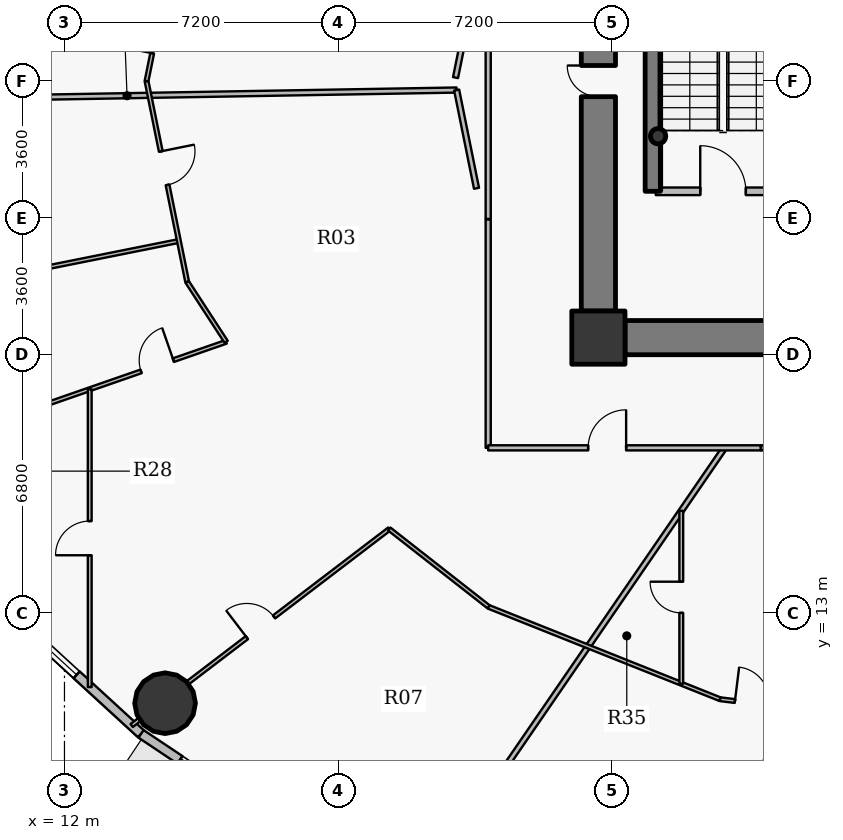
"""IFC4 building model, lengths in metres.
Left out: names, types, materials, properties, quantities, classifications, styles, units other than length and angle.
Written with IfcOpenShell. Run it as: python <this file> out.ifc"""

import sys

from ifc_helpers import new_model, si_unit, direction, frame, frame_2d, origin, origin_2d, place, context, subcontext, project, spatial, rectangle, hollow_circle, extrude, source, transform, mapped, element, fill, save


model = new_model("IFC4")
c1 = context("Model", 3, precision=1e-05, world=origin(), true_north=direction((0.0, 1.0)))
c2 = subcontext(c1, "Body", "Model", "MODEL_VIEW")
j1 = project(units=[si_unit("LENGTHUNIT", "METRE"), si_unit("PLANEANGLEUNIT", "RADIAN")], contexts=[c1])
p1 = place(None, origin())
s1 = spatial("IfcSite", under=j1, at=p1, CompositionType="ELEMENT")
p2 = place(p1, origin())
s2 = spatial("IfcBuilding", under=s1, at=p2, CompositionType="ELEMENT")
p3 = place(p2, frame((0.0, 0.0, 78.6)))
s3 = spatial("IfcBuildingStorey", under=s2, at=p3, CompositionType="ELEMENT", Elevation=78.6)
p4 = place(p3, frame((26.05, 20.25, 0.0), z_axis=(0.0, 0.0, 1.0), x_axis=(1.0, 0.0, 0.0)))
e1 = element("IfcColumn", 1, at=p4, inside=s3, PredefinedType="COLUMN", context=c2, shape_type="SweptSolid", body=[
    extrude(rectangle(XDim=1.4, YDim=1.4, at=origin_2d()), origin(), (0.0, 0.0, 1.0), 4.2),
])
p5 = place(p3, frame((27.48, 24.1, 0.0), z_axis=(0.0, 0.0, 1.0), x_axis=(0.0, 1.0, 0.0)))
e2 = element("IfcWall", 2, at=p5, inside=s3, PredefinedType="SHEAR", context=c2, shape_type="SweptSolid", body=[
    extrude(rectangle(XDim=8.6, YDim=0.4, at=frame_2d((4.3, 0.0))), origin(), (0.0, 0.0, 1.0), 4.2),
])
p6 = place(p3, frame((27.62, 25.55, 0.0), z_axis=(0.0, 0.0, 1.0), x_axis=(1.0, 0.0, 0.0)))
e3 = element("IfcColumn", 3, at=p6, inside=s3, PredefinedType="COLUMN", context=c2, shape_type="SweptSolid", body=[
    extrude(hollow_circle(Radius=0.203, WallThickness=0.016, at=origin_2d()), origin(), (0.0, 0.0, 1.0), 4.2),
])
p7 = place(p3, frame((45.25, 20.25, 0.0), z_axis=(0.0, 0.0, 1.0), x_axis=(-1.0, 0.0, 0.0)))
e4 = element("IfcWall", 4, at=p7, inside=s3, PredefinedType="SHEAR", context=c2, shape_type="SweptSolid", body=[
    extrude(rectangle(XDim=18.5, YDim=0.9, at=frame_2d((9.25, 0.0))), origin(), (0.0, 0.0, 1.0), 3.4),
])
p8 = place(p7, frame((10.0, 0.0, 0.0)))
e5 = element("IfcOpeningElement", 5, at=p8, cuts=e4, PredefinedType="OPENING", context=c2, shape_type="SweptSolid", body=[
    extrude(rectangle(XDim=1.15, YDim=2.15, at=origin_2d()), frame((0.575, 0.46, 1.075), z_axis=(0.0, -1.0, 0.0), x_axis=(1.0, 0.0, 0.0)), (0.0, 0.0, 1.0), 0.92),
])
p9 = place(p3, frame((26.05, 20.95, 0.0), z_axis=(0.0, 0.0, 1.0), x_axis=(0.0, 1.0, 0.0)))
e6 = element("IfcWall", 6, at=p9, inside=s3, PredefinedType="SHEAR", context=c2, shape_type="SweptSolid", body=[
    extrude(rectangle(XDim=12.1, YDim=0.9, at=frame_2d((6.05, 0.0))), origin(), (0.0, 0.0, 1.0), 3.4),
])
p10 = place(p9, frame((5.64, 0.0, 0.0)))
e7 = element("IfcOpeningElement", 7, at=p10, cuts=e6, PredefinedType="OPENING", context=c2, shape_type="SweptSolid", body=[
    extrude(rectangle(XDim=0.82, YDim=2.1, at=origin_2d()), frame((0.41, 0.46, 1.05), z_axis=(0.0, -1.0, 0.0), x_axis=(1.0, 0.0, 0.0)), (0.0, 0.0, 1.0), 0.92),
])
p11 = place(p3, frame((14.647, 10.631, 0.0), z_axis=(0.0, 0.0, 1.0), x_axis=(1.0, 0.0, 0.0)))
e8 = element("IfcColumn", 8, at=p11, inside=s3, PredefinedType="COLUMN", context=c2, shape_type="SweptSolid", body=[
    extrude(hollow_circle(Radius=0.8, WallThickness=0.045, at=origin_2d()), origin(), (0.0, 0.0, 1.0), 4.2),
])
p12 = place(p3, frame((14.015, 9.824, 0.0), z_axis=(0.0, 0.0, 1.0), x_axis=(-0.737116376281, 0.67576582321, 0.0)))
e9 = element("IfcWall", 9, at=p12, inside=s3, PredefinedType="SOLIDWALL", context=c2, shape_type="SweptSolid", body=[
    extrude(rectangle(XDim=4.294, YDim=0.24, at=frame_2d((2.147, 0.0))), origin(), (0.0, 0.0, 1.0), 3.95),
])
p13 = place(p12, frame((2.3, 0.0, 0.9)))
e10 = element("IfcOpeningElement", 10, at=p13, cuts=e9, PredefinedType="OPENING", context=c2, shape_type="SweptSolid", body=[
    extrude(rectangle(XDim=1.25, YDim=1.65, at=origin_2d()), frame((0.625, 0.13, 0.825), z_axis=(0.0, -1.0, 0.0), x_axis=(1.0, 0.0, 0.0)), (0.0, 0.0, 1.0), 0.26),
])
p14 = place(p3, frame((17.723, 7.344, 0.0), z_axis=(0.0, 0.0, 1.0), x_axis=(-0.831240982525, 0.555912249343, 0.0)))
e11 = element("IfcWall", 11, at=p14, inside=s3, PredefinedType="SOLIDWALL", context=c2, shape_type="SweptSolid", body=[
    extrude(rectangle(XDim=4.46, YDim=0.24, at=frame_2d((2.23, 0.0))), origin(), (0.0, 0.0, 1.0), 3.95),
])
p15 = place(p14, frame((1.23, 0.0, 0.9)))
e12 = element("IfcOpeningElement", 12, at=p15, cuts=e11, PredefinedType="OPENING", context=c2, shape_type="SweptSolid", body=[
    extrude(rectangle(XDim=2.0, YDim=1.75, at=origin_2d()), frame((1.0, 0.13, 0.875), z_axis=(0.0, -1.0, 0.0), x_axis=(1.0, 0.0, 0.0)), (0.0, 0.0, 1.0), 0.26),
])
p16 = place(p3, frame((4.974, 26.466, 0.0), z_axis=(0.0, 0.0, 1.0), x_axis=(0.999851881099, 0.017210922752, 0.0)))
e13 = element("IfcWall", 13, at=p16, inside=s3, PredefinedType="PARTITIONING", context=c2, shape_type="SweptSolid", body=[
    extrude(rectangle(XDim=17.349, YDim=0.135, at=frame_2d((8.674, 0.0))), origin(), (0.0, 0.0, 1.0), 3.285),
])
p17 = place(p3, frame((5.982, 20.983, 0.0), z_axis=(0.0, 0.0, 1.0), x_axis=(0.980501056264, 0.19651381291, 0.0)))
e14 = element("IfcWall", 14, at=p17, inside=s3, PredefinedType="PARTITIONING", context=c2, shape_type="SweptSolid", body=[
    extrude(rectangle(XDim=9.208, YDim=0.1, at=frame_2d((4.604, 0.0))), origin(), (0.0, 0.0, 1.0), 3.335),
])
p18 = place(p3, frame((7.675, 17.158, 0.0), z_axis=(0.0, 0.0, 1.0), x_axis=(0.944607706733, 0.328201584976, 0.0)))
e15 = element("IfcWall", 15, at=p18, inside=s3, PredefinedType="PARTITIONING", context=c2, shape_type="SweptSolid", body=[
    extrude(rectangle(XDim=9.083, YDim=0.1, at=frame_2d((4.542, 0.0))), origin(), (0.0, 0.0, 1.0), 3.335),
])
p19 = place(p18, frame((6.713, 0.0, 0.0)))
e16 = element("IfcOpeningElement", 16, at=p19, cuts=e15, PredefinedType="OPENING", context=c2, shape_type="SweptSolid", body=[
    extrude(rectangle(XDim=0.9, YDim=2.1, at=origin_2d()), frame((0.45, 0.06, 1.05), z_axis=(0.0, -1.0, 0.0), x_axis=(1.0, 0.0, 0.0)), (0.0, 0.0, 1.0), 0.12),
])
p20 = place(p18, frame((1.046, 0.0, 0.0)))
e17 = element("IfcOpeningElement", 17, at=p20, cuts=e15, PredefinedType="OPENING", context=c2, shape_type="SweptSolid", body=[
    extrude(rectangle(XDim=0.82, YDim=2.1, at=origin_2d()), frame((0.41, 0.06, 1.05), z_axis=(0.0, -1.0, 0.0), x_axis=(1.0, 0.0, 0.0)), (0.0, 0.0, 1.0), 0.12),
])
p21 = place(p3, frame((12.665, 11.055, 0.0), z_axis=(0.0, 0.0, 1.0), x_axis=(0.0, 1.0, 0.0)))
e18 = element("IfcWall", 18, at=p21, inside=s3, PredefinedType="PARTITIONING", context=c2, shape_type="SweptSolid", body=[
    extrude(rectangle(XDim=7.837, YDim=0.1, at=frame_2d((3.919, 0.0))), origin(), (0.0, 0.0, 1.0), 3.335),
])
p22 = place(p21, frame((3.469, 0.0, 0.0)))
e19 = element("IfcOpeningElement", 19, at=p22, cuts=e18, PredefinedType="OPENING", context=c2, shape_type="SweptSolid", body=[
    extrude(rectangle(XDim=0.9, YDim=2.1, at=origin_2d()), frame((0.45, 0.06, 1.05), z_axis=(0.0, -1.0, 0.0), x_axis=(1.0, 0.0, 0.0)), (0.0, 0.0, 1.0), 0.12),
])
p23 = place(p3, frame((13.768, 10.043, 0.0), z_axis=(0.0, 0.0, 1.0), x_axis=(0.795121316636, 0.606450403439, 0.0)))
e20 = element("IfcWall", 20, at=p23, inside=s3, PredefinedType="PARTITIONING", context=c2, shape_type="SweptSolid", body=[
    extrude(rectangle(XDim=8.525, YDim=0.1, at=frame_2d((4.262, 0.0))), origin(), (0.0, 0.0, 1.0), 3.285),
])
p24 = place(p23, frame((3.812, 0.0, 0.0)))
e21 = element("IfcOpeningElement", 21, at=p24, cuts=e20, PredefinedType="OPENING", context=c2, shape_type="SweptSolid", body=[
    extrude(rectangle(XDim=0.9, YDim=2.1, at=origin_2d()), frame((0.45, 0.06, 1.05), z_axis=(0.0, -1.0, 0.0), x_axis=(1.0, 0.0, 0.0)), (0.0, 0.0, 1.0), 0.12),
])
p25 = place(p3, frame((14.16, 27.0, 0.0), z_axis=(0.0, 0.0, 1.0), x_axis=(0.198292702032, -0.980142848936, 0.0)))
e22 = element("IfcWall", 22, at=p25, inside=s3, PredefinedType="PARTITIONING", context=c2, shape_type="SweptSolid", body=[
    extrude(rectangle(XDim=5.392, YDim=0.1, at=frame_2d((2.696, 0.0))), origin(), (0.0, 0.0, 1.0), 3.285),
])
p26 = place(p25, frame((1.887, 0.0, 0.0)))
e23 = element("IfcOpeningElement", 23, at=p26, cuts=e22, PredefinedType="OPENING", context=c2, shape_type="SweptSolid", body=[
    extrude(rectangle(XDim=0.9, YDim=2.1, at=origin_2d()), frame((0.45, 0.06, 1.05), z_axis=(0.0, -1.0, 0.0), x_axis=(1.0, 0.0, 0.0)), (0.0, 0.0, 1.0), 0.12),
])
p27 = place(p3, frame((14.16, 27.0, 0.0), z_axis=(0.0, 0.0, 1.0), x_axis=(0.198292702032, 0.980142848936, 0.0)))
e24 = element("IfcWall", 24, at=p27, inside=s3, PredefinedType="PARTITIONING", context=c2, shape_type="SweptSolid", body=[
    extrude(rectangle(XDim=5.392, YDim=0.1, at=frame_2d((2.696, 0.0))), origin(), (0.0, 0.0, 1.0), 3.285),
])
p28 = place(p27, frame((0.749, 0.0, 0.0)))
e25 = element("IfcOpeningElement", 25, at=p28, cuts=e24, PredefinedType="OPENING", context=c2, shape_type="SweptSolid", body=[
    extrude(rectangle(XDim=0.9, YDim=2.1, at=origin_2d()), frame((0.45, 0.06, 1.05), z_axis=(0.0, -1.0, 0.0), x_axis=(1.0, 0.0, 0.0)), (0.0, 0.0, 1.0), 0.12),
])
p29 = place(p3, frame((15.229, 21.716, 0.0), z_axis=(0.0, 0.0, 1.0), x_axis=(0.545316895374, -0.838229970604, 0.0)))
e26 = element("IfcWall", 26, at=p29, inside=s3, PredefinedType="PARTITIONING", context=c2, shape_type="SweptSolid", body=[
    extrude(rectangle(XDim=1.88, YDim=0.1, at=frame_2d((0.94, 0.0))), origin(), (0.0, 0.0, 1.0), 3.285),
])
p30 = place(p3, frame((20.547, 15.213, 0.0), z_axis=(0.0, 0.0, 1.0), x_axis=(0.78737784261, -0.616470707307, 0.0)))
e27 = element("IfcWall", 27, at=p30, inside=s3, PredefinedType="PARTITIONING", context=c2, shape_type="SweptSolid", body=[
    extrude(rectangle(XDim=3.323, YDim=0.1, at=frame_2d((1.661, 0.0))), origin(), (0.0, 0.0, 1.0), 3.285),
])
p31 = place(p3, frame((21.309, 5.618, 0.0), z_axis=(0.0, 0.0, 1.0), x_axis=(0.566302415372, 0.82419753357, 0.0)))
e28 = element("IfcWall", 28, at=p31, inside=s3, PredefinedType="PARTITIONING", context=c2, shape_type="SweptSolid", body=[
    extrude(rectangle(XDim=14.234, YDim=0.135, at=frame_2d((7.117, 0.0))), origin(), (0.0, 0.0, 1.0), 3.285),
])
p32 = place(p3, frame((23.15, 17.35, 0.0), z_axis=(0.0, 0.0, 1.0), x_axis=(0.0, 1.0, 0.0)))
e29 = element("IfcWall", 29, at=p32, inside=s3, PredefinedType="PARTITIONING", context=c2, shape_type="SweptSolid", body=[
    extrude(rectangle(XDim=6.011, YDim=0.135, at=frame_2d((3.006, 0.0))), origin(), (0.0, 0.0, 1.0), 3.285),
])
p33 = place(p3, frame((23.15, 17.35, 0.0), z_axis=(0.0, 0.0, 1.0), x_axis=(1.0, 0.0, 0.0)))
e30 = element("IfcWall", 30, at=p33, inside=s3, PredefinedType="PARTITIONING", context=c2, shape_type="SweptSolid", body=[
    extrude(rectangle(XDim=7.171, YDim=0.135, at=frame_2d((3.586, 0.0))), origin(), (0.0, 0.0, 1.0), 3.285),
])
p34 = place(p33, frame((2.63, 0.0, 0.0)))
e31 = element("IfcOpeningElement", 31, at=p34, cuts=e30, PredefinedType="OPENING", context=c2, shape_type="SweptSolid", body=[
    extrude(rectangle(XDim=1.0, YDim=2.15, at=origin_2d()), frame((0.5, 0.078, 1.075), z_axis=(0.0, -1.0, 0.0), x_axis=(1.0, 0.0, 0.0)), (0.0, 0.0, 1.0), 0.155),
])
p35 = place(p3, frame((23.163, 13.165, 0.0), z_axis=(0.0, 0.0, 1.0), x_axis=(0.928799979038, -0.370581433613, 0.0)))
e32 = element("IfcWall", 32, at=p35, inside=s3, PredefinedType="PARTITIONING", context=c2, shape_type="SweptSolid", body=[
    extrude(rectangle(XDim=6.555, YDim=0.1, at=frame_2d((3.278, 0.0))), origin(), (0.0, 0.0, 1.0), 3.285),
])
p36 = place(p3, frame((27.56, 24.1, 0.0), z_axis=(0.0, 0.0, 1.0), x_axis=(1.0, 0.0, 0.0)))
e33 = element("IfcWall", 33, at=p36, inside=s3, PredefinedType="PARTITIONING", context=c2, shape_type="SweptSolid", body=[
    extrude(rectangle(XDim=3.54, YDim=0.2, at=frame_2d((1.77, 0.0))), origin(), (0.0, 0.0, 1.0), 3.95),
])
p37 = place(p36, frame((1.17, 0.0, 0.0)))
e34 = element("IfcOpeningElement", 34, at=p37, cuts=e33, PredefinedType="OPENING", context=c2, shape_type="SweptSolid", body=[
    extrude(rectangle(XDim=1.2, YDim=2.15, at=origin_2d()), frame((0.6, 0.11, 1.075), z_axis=(0.0, -1.0, 0.0), x_axis=(1.0, 0.0, 0.0)), (0.0, 0.0, 1.0), 0.22),
])
p38 = place(p3, frame((28.231, 11.143, 0.0), z_axis=(0.0, 0.0, 1.0), x_axis=(0.0, 1.0, 0.0)))
e35 = element("IfcWall", 35, at=p38, inside=s3, PredefinedType="PARTITIONING", context=c2, shape_type="SweptSolid", body=[
    extrude(rectangle(XDim=4.55, YDim=0.1, at=frame_2d((2.275, 0.0))), origin(), (0.0, 0.0, 1.0), 3.285),
])
p39 = place(p38, frame((1.865, 0.0, 0.0)))
e36 = element("IfcOpeningElement", 36, at=p39, cuts=e35, PredefinedType="OPENING", context=c2, shape_type="SweptSolid", body=[
    extrude(rectangle(XDim=0.82, YDim=2.1, at=origin_2d()), frame((0.41, 0.06, 1.05), z_axis=(0.0, -1.0, 0.0), x_axis=(1.0, 0.0, 0.0)), (0.0, 0.0, 1.0), 0.12),
])
p40 = place(p3, frame((28.689, 3.449, 0.0), z_axis=(0.0, 0.0, 1.0), x_axis=(0.296478934609, 0.955039392556, 0.0)))
e37 = element("IfcWall", 37, at=p40, inside=s3, PredefinedType="PARTITIONING", context=c2, shape_type="SweptSolid", body=[
    extrude(rectangle(XDim=7.417, YDim=0.1, at=frame_2d((3.708, 0.0))), origin(), (0.0, 0.0, 1.0), 3.335),
])
p41 = place(p3, frame((29.251, 10.736, 0.0), z_axis=(0.0, 0.0, 1.0), x_axis=(0.992394520877, -0.123097989151, 0.0)))
e38 = element("IfcWall", 38, at=p41, inside=s3, PredefinedType="PARTITIONING", context=c2, shape_type="SweptSolid", body=[
    extrude(rectangle(XDim=6.801, YDim=0.1, at=frame_2d((3.4, 0.0))), origin(), (0.0, 0.0, 1.0), 3.285),
])
p42 = place(p41, frame((0.395, 0.0, 0.0)))
e39 = element("IfcOpeningElement", 39, at=p42, cuts=e38, PredefinedType="OPENING", context=c2, shape_type="SweptSolid", body=[
    extrude(rectangle(XDim=0.9, YDim=2.1, at=origin_2d()), frame((0.45, 0.06, 1.05), z_axis=(0.0, -1.0, 0.0), x_axis=(1.0, 0.0, 0.0)), (0.0, 0.0, 1.0), 0.12),
])
p43 = place(p3, frame((35.99, 17.35, 0.0), z_axis=(0.0, 0.0, 1.0), x_axis=(-1.0, 0.0, 0.0)))
e40 = element("IfcWall", 40, at=p43, inside=s3, PredefinedType="PARTITIONING", context=c2, shape_type="SweptSolid", body=[
    extrude(rectangle(XDim=5.659, YDim=0.135, at=frame_2d((2.829, 0.0))), origin(), (0.0, 0.0, 1.0), 3.285),
])
p44 = place(p3, frame((23.15, 23.372, 0.0), z_axis=(0.0, 0.0, 1.0), x_axis=(0.0, 1.0, 0.0)))
e41 = element("IfcWall", 41, at=p44, inside=s3, PredefinedType="PARTITIONING", context=c2, shape_type="SweptSolid", body=[
    extrude(rectangle(XDim=7.257, YDim=0.135, at=frame_2d((3.628, 0.0))), origin(), (0.0, 0.0, 1.0), 3.285),
])
p45 = place(p3, frame((25.6, 20.94, 0.0), z_axis=(0.0, 0.0, 1.0), x_axis=(0.0, -1.0, 0.0)))
e42 = element("IfcWall", 42, at=p45, inside=s3, PredefinedType="PARTITIONING", context=c2, shape_type="SweptSolid", body=[
    extrude(rectangle(XDim=1.14, YDim=0.135, at=frame_2d((0.57, 0.0))), origin(), (0.0, 0.0, 1.0), 3.95),
])
p46 = place(p3, frame((25.907, 19.8, 0.0), z_axis=(0.0, 0.0, 1.0), x_axis=(1.0, 0.0, 0.0)))
e43 = element("IfcWall", 43, at=p46, inside=s3, PredefinedType="PARTITIONING", context=c2, shape_type="SweptSolid", body=[
    extrude(rectangle(XDim=0.833, YDim=0.135, at=frame_2d((0.416, 0.0))), origin(), (0.0, 0.0, 1.0), 3.285),
])
p47 = place(p3, frame((22.843, 29.82, 0.0), z_axis=(0.0, 0.0, 1.0), x_axis=(-0.198274261102, -0.98014657954, 0.0)))
e44 = element("IfcWall", 44, at=p47, inside=s3, PredefinedType="PARTITIONING", context=c2, shape_type="SweptSolid", body=[
    extrude(rectangle(XDim=2.784, YDim=0.135, at=frame_2d((1.392, 0.0))), origin(), (0.0, 0.0, 1.0), 3.285),
])
p48 = place(p3, frame((22.32, 26.765, 0.0), z_axis=(0.0, 0.0, 1.0), x_axis=(0.198287516938, -0.980143897918, 0.0)))
e45 = element("IfcWall", 45, at=p48, inside=s3, PredefinedType="PARTITIONING", context=c2, shape_type="SweptSolid", body=[
    extrude(rectangle(XDim=2.637, YDim=0.135, at=frame_2d((1.319, 0.0))), origin(), (0.0, 0.0, 1.0), 3.95),
])
m1 = source(origin(), c2, "Body", "SweptSolid", [
    extrude(rectangle(XDim=1.25, YDim=1.65, at=origin_2d()), frame((0.625, 0.03, 0.825), z_axis=(0.0, -1.0, 0.0), x_axis=(1.0, 0.0, 0.0)), (0.0, 0.0, 1.0), 0.06),
])
p49 = place(p13, origin())
e46 = element("IfcWindow", 46, at=p49, inside=s3, PartitioningType="SINGLE_PANEL", PredefinedType="WINDOW", context=c2, shape_type="MappedRepresentation", body=[
    mapped(m1, transform((0.0, 0.0, 0.0), x_axis=(1.0, 0.0, 0.0), y_axis=(0.0, 1.0, 0.0), z_axis=(0.0, 0.0, 1.0), scale=1.0)),
])
fill(e10, e46)
m2 = source(origin(), c2, "Body", "SweptSolid", [
    extrude(rectangle(XDim=2.0, YDim=1.75, at=origin_2d()), frame((1.0, 0.03, 0.875), z_axis=(0.0, -1.0, 0.0), x_axis=(1.0, 0.0, 0.0)), (0.0, 0.0, 1.0), 0.06),
])
p50 = place(p15, origin())
e47 = element("IfcWindow", 47, at=p50, inside=s3, PartitioningType="DOUBLE_PANEL_VERTICAL", PredefinedType="WINDOW", context=c2, shape_type="MappedRepresentation", body=[
    mapped(m2, transform((0.0, 0.0, 0.0), x_axis=(1.0, 0.0, 0.0), y_axis=(0.0, 1.0, 0.0), z_axis=(0.0, 0.0, 1.0), scale=1.0)),
])
fill(e12, e47)
m3 = source(origin(), c2, "Body", "SweptSolid", [
    extrude(rectangle(XDim=0.82, YDim=2.1, at=origin_2d()), frame((0.41, 0.025, 1.05), z_axis=(0.0, -1.0, 0.0), x_axis=(1.0, 0.0, 0.0)), (0.0, 0.0, 1.0), 0.05),
])
p51 = place(p10, origin())
e48 = element("IfcDoor", 48, at=p51, inside=s3, OperationType="SINGLE_SWING_RIGHT", PredefinedType="DOOR", context=c2, shape_type="MappedRepresentation", body=[
    mapped(m3, transform((0.0, 0.0, 0.0), x_axis=(1.0, 0.0, 0.0), y_axis=(0.0, 1.0, 0.0), z_axis=(0.0, 0.0, 1.0), scale=1.0)),
])
fill(e7, e48)
m4 = source(origin(), c2, "Body", "SweptSolid", [
    extrude(rectangle(XDim=1.2, YDim=2.15, at=origin_2d()), frame((0.6, 0.025, 1.075), z_axis=(0.0, -1.0, 0.0), x_axis=(1.0, 0.0, 0.0)), (0.0, 0.0, 1.0), 0.05),
])
p52 = place(p37, origin())
e49 = element("IfcDoor", 49, at=p52, inside=s3, OperationType="SINGLE_SWING_LEFT", PredefinedType="DOOR", context=c2, shape_type="MappedRepresentation", body=[
    mapped(m4, transform((0.0, 0.0, 0.0), x_axis=(1.0, 0.0, 0.0), y_axis=(0.0, 1.0, 0.0), z_axis=(0.0, 0.0, 1.0), scale=1.0)),
])
fill(e34, e49)
m5 = source(origin(), c2, "Body", "SweptSolid", [
    extrude(rectangle(XDim=0.9, YDim=2.1, at=origin_2d()), frame((0.45, 0.025, 1.05), z_axis=(0.0, -1.0, 0.0), x_axis=(1.0, 0.0, 0.0)), (0.0, 0.0, 1.0), 0.05),
])
p53 = place(p28, origin())
e50 = element("IfcDoor", 50, at=p53, inside=s3, OperationType="SINGLE_SWING_LEFT", PredefinedType="DOOR", context=c2, shape_type="MappedRepresentation", body=[
    mapped(m5, transform((0.0, 0.0, 0.0), x_axis=(1.0, 0.0, 0.0), y_axis=(0.0, 1.0, 0.0), z_axis=(0.0, 0.0, 1.0), scale=1.0)),
])
fill(e25, e50)
m6 = source(origin(), c2, "Body", "SweptSolid", [
    extrude(rectangle(XDim=1.0, YDim=2.15, at=origin_2d()), frame((0.5, 0.025, 1.075), z_axis=(0.0, -1.0, 0.0), x_axis=(1.0, 0.0, 0.0)), (0.0, 0.0, 1.0), 0.05),
])
p54 = place(p34, origin())
e51 = element("IfcDoor", 51, at=p54, inside=s3, OperationType="SINGLE_SWING_RIGHT", PredefinedType="DOOR", context=c2, shape_type="MappedRepresentation", body=[
    mapped(m6, transform((0.0, 0.0, 0.0), x_axis=(1.0, 0.0, 0.0), y_axis=(0.0, 1.0, 0.0), z_axis=(0.0, 0.0, 1.0), scale=1.0)),
])
fill(e31, e51)
p55 = place(p26, origin())
e52 = element("IfcDoor", 52, at=p55, inside=s3, OperationType="SINGLE_SWING_LEFT", PredefinedType="DOOR", context=c2, shape_type="MappedRepresentation", body=[
    mapped(m5, transform((0.0, 0.0, 0.0), x_axis=(1.0, 0.0, 0.0), y_axis=(0.0, 1.0, 0.0), z_axis=(0.0, 0.0, 1.0), scale=1.0)),
])
fill(e23, e52)
p56 = place(p19, origin())
e53 = element("IfcDoor", 53, at=p56, inside=s3, OperationType="SINGLE_SWING_RIGHT", PredefinedType="DOOR", context=c2, shape_type="MappedRepresentation", body=[
    mapped(m5, transform((0.0, 0.0, 0.0), x_axis=(1.0, 0.0, 0.0), y_axis=(0.0, 1.0, 0.0), z_axis=(0.0, 0.0, 1.0), scale=1.0)),
])
fill(e16, e53)
p57 = place(p24, origin())
e54 = element("IfcDoor", 54, at=p57, inside=s3, OperationType="SINGLE_SWING_LEFT", PredefinedType="DOOR", context=c2, shape_type="MappedRepresentation", body=[
    mapped(m5, transform((0.0, 0.0, 0.0), x_axis=(1.0, 0.0, 0.0), y_axis=(0.0, 1.0, 0.0), z_axis=(0.0, 0.0, 1.0), scale=1.0)),
])
fill(e21, e54)
p58 = place(p22, origin())
e55 = element("IfcDoor", 55, at=p58, inside=s3, OperationType="SINGLE_SWING_LEFT", PredefinedType="DOOR", context=c2, shape_type="MappedRepresentation", body=[
    mapped(m5, transform((0.0, 0.0, 0.0), x_axis=(1.0, 0.0, 0.0), y_axis=(0.0, 1.0, 0.0), z_axis=(0.0, 0.0, 1.0), scale=1.0)),
])
fill(e19, e55)
p59 = place(p42, origin())
e56 = element("IfcDoor", 56, at=p59, inside=s3, OperationType="SINGLE_SWING_LEFT", PredefinedType="DOOR", context=c2, shape_type="MappedRepresentation", body=[
    mapped(m5, transform((0.0, 0.0, 0.0), x_axis=(1.0, 0.0, 0.0), y_axis=(0.0, 1.0, 0.0), z_axis=(0.0, 0.0, 1.0), scale=1.0)),
])
fill(e39, e56)
p60 = place(p39, origin())
e57 = element("IfcDoor", 57, at=p60, inside=s3, OperationType="SINGLE_SWING_RIGHT", PredefinedType="DOOR", context=c2, shape_type="MappedRepresentation", body=[
    mapped(m3, transform((0.0, 0.0, 0.0), x_axis=(1.0, 0.0, 0.0), y_axis=(0.0, 1.0, 0.0), z_axis=(0.0, 0.0, 1.0), scale=1.0)),
])
fill(e36, e57)
save(model, sys.argv[1])
